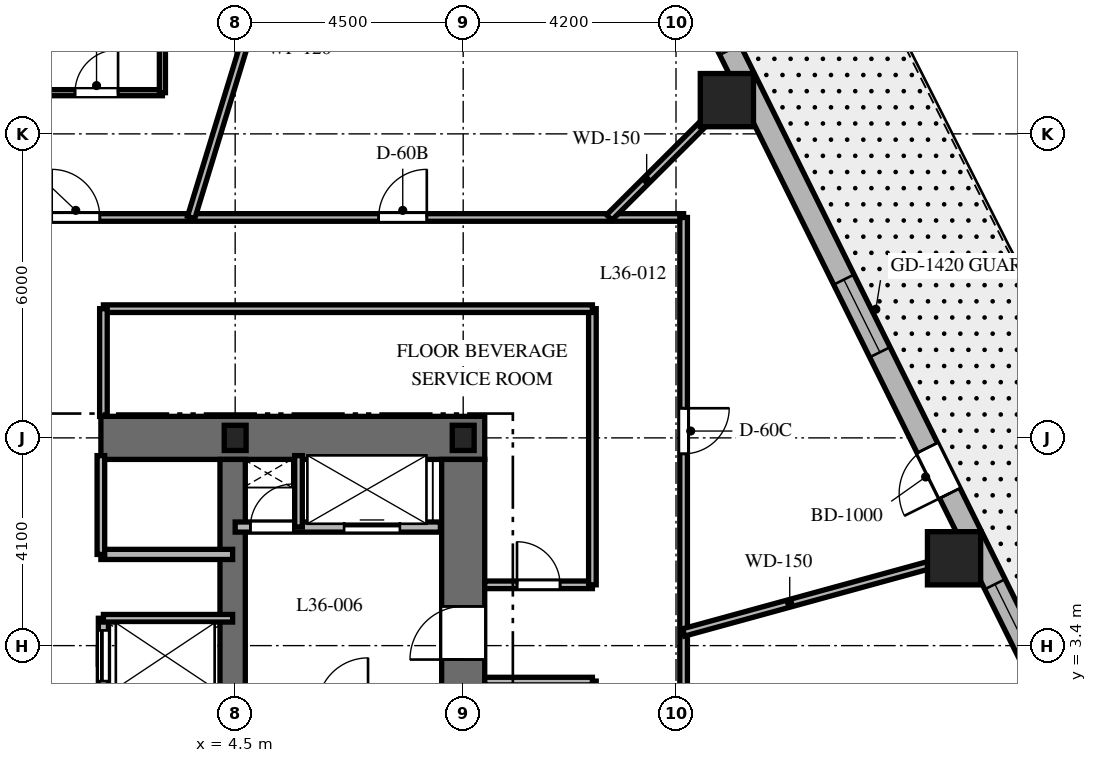
"""IFC4 building model, lengths in metres.
Left out: names, types, materials, properties, quantities, classifications, styles, units other than length and angle.
Written with IfcOpenShell. Run it as: python <this file> out.ifc"""

import sys

from ifc_helpers import new_model, si_unit, direction, frame, frame_2d, origin, origin_2d, place, context, subcontext, project, spatial, rectangle, i_section, extrude, element, fill, save


model = new_model("IFC4")
c1 = context("Model", 3, precision=1e-05, world=origin(), true_north=direction((0.0, 1.0)))
c2 = subcontext(c1, "Body", "Model", "MODEL_VIEW")
j1 = project(units=[si_unit("LENGTHUNIT", "METRE"), si_unit("PLANEANGLEUNIT", "RADIAN")], contexts=[c1])
p1 = place(None, origin())
s1 = spatial("IfcSite", under=j1, at=p1, CompositionType="ELEMENT")
p2 = place(p1, origin())
s2 = spatial("IfcBuilding", under=s1, at=p2, CompositionType="ELEMENT")
p3 = place(p2, frame((0.0, 0.0, 148.0)))
s3 = spatial("IfcBuildingStorey", under=s2, at=p3, CompositionType="ELEMENT", Elevation=148.0)
p4 = place(p3, frame((1.85, 7.5, 0.0), z_axis=(0.0, 0.0, 1.0), x_axis=(1.0, 0.0, 0.0)))
e1 = element("IfcWall", 1, at=p4, inside=s3, PredefinedType="SHEAR", context=c2, shape_type="SweptSolid", body=[
    extrude(rectangle(XDim=7.575, YDim=0.85, at=frame_2d((3.788, 0.0))), origin(), (0.0, 0.0, 1.0), 3.7),
])
p5 = place(p3, frame((9.0, -7.075, 0.0), z_axis=(0.0, 0.0, 1.0), x_axis=(0.0, 1.0, 0.0)))
e2 = element("IfcWall", 2, at=p5, inside=s3, PredefinedType="SHEAR", context=c2, shape_type="SweptSolid", body=[
    extrude(rectangle(XDim=14.15, YDim=0.85, at=frame_2d((7.075, 0.0))), origin(), (0.0, 0.0, 1.0), 3.7),
])
p6 = place(p5, frame((10.2, 0.0, 0.0)))
e3 = element("IfcOpeningElement", 3, at=p6, cuts=e2, PredefinedType="OPENING", context=c2, shape_type="SweptSolid", body=[
    extrude(rectangle(XDim=1.05, YDim=2.15, at=frame_2d((0.525, 1.075))), frame((0.0, 0.435, 0.0), z_axis=(0.0, -1.0, 0.0), x_axis=(1.0, 0.0, 0.0)), (0.0, 0.0, 1.0), 0.87),
])
p7 = place(p3, frame((4.45, 2.25, 0.0), z_axis=(0.0, 0.0, 1.0), x_axis=(0.0, 1.0, 0.0)))
e4 = element("IfcWall", 4, at=p7, inside=s3, PredefinedType="SHEAR", context=c2, shape_type="SweptSolid", body=[
    extrude(rectangle(XDim=4.825, YDim=0.5, at=frame_2d((2.413, 0.0))), origin(), (0.0, 0.0, 1.0), 3.7),
])
for number, where, z_axis, x_axis in (
    (5, (9.0, 7.5, 0.0), (0.0, 0.0, 1.0), (1.0, 0.0, 0.0)),
    (6, (4.5, 7.5, 0.0), (0.0, 0.0, 1.0), (1.0, 0.0, 0.0)),
):
    element("IfcColumn", number, at=place(p3, frame(where, z_axis=z_axis, x_axis=x_axis)), inside=s3, PredefinedType="COLUMN", context=c2, shape_type="SweptSolid", body=[
        extrude(i_section(OverallWidth=0.432, OverallDepth=0.498, WebThickness=0.056, FlangeThickness=0.089, at=origin_2d()), origin(), (0.0, 0.0, 1.0), 3.7),
    ])
for number, where, z_axis, x_axis in (
    (7, (18.687, 5.124, 0.0), (0.0, 0.0, 1.0), (1.0, 0.0, 0.0)),
    (8, (14.204, 14.166, 0.0), (0.0, 0.0, 1.0), (1.0, 0.0, 0.0)),
):
    element("IfcColumn", number, at=place(p3, frame(where, z_axis=z_axis, x_axis=x_axis)), inside=s3, PredefinedType="COLUMN", context=c2, shape_type="SweptSolid", body=[
        extrude(rectangle(XDim=1.05, YDim=1.05, at=origin_2d()), origin(), (0.0, 0.0, 1.0), 3.7),
    ])
p8 = place(p3, frame((20.618, 2.344, 0.0), z_axis=(0.0, 0.0, 1.0), x_axis=(-0.444243691097, 0.895905990002, 0.0)))
e9 = element("IfcWall", 9, at=p8, inside=s3, PredefinedType="SOLIDWALL", context=c2, shape_type="SweptSolid", body=[
    extrude(rectangle(XDim=16.784, YDim=0.45, at=frame_2d((8.392, 0.0))), origin(), (0.0, 0.0, 1.0), 3.4),
])
p9 = place(p8, frame((4.535, 0.0, 0.0)))
e10 = element("IfcOpeningElement", 10, at=p9, cuts=e9, PredefinedType="OPENING", context=c2, shape_type="SweptSolid", body=[
    extrude(rectangle(XDim=1.0, YDim=2.15, at=frame_2d((0.5, 1.075))), frame((0.0, 0.235, 0.0), z_axis=(0.0, -1.0, 0.0), x_axis=(1.0, 0.0, 0.0)), (0.0, 0.0, 1.0), 0.47),
])
p10 = place(p8, frame((7.642, 0.0, 0.8)))
e11 = element("IfcOpeningElement", 11, at=p10, cuts=e9, PredefinedType="OPENING", context=c2, shape_type="SweptSolid", body=[
    extrude(rectangle(XDim=1.6, YDim=1.75, at=frame_2d((0.8, 0.875))), frame((0.0, 0.235, 0.0), z_axis=(0.0, -1.0, 0.0), x_axis=(1.0, 0.0, 0.0)), (0.0, 0.0, 1.0), 0.47),
])
p11 = place(p8, frame((14.303, 0.0, 0.8)))
e12 = element("IfcOpeningElement", 12, at=p11, cuts=e9, PredefinedType="OPENING", context=c2, shape_type="SweptSolid", body=[
    extrude(rectangle(XDim=1.6, YDim=1.75, at=frame_2d((0.8, 0.875))), frame((0.0, 0.235, 0.0), z_axis=(0.0, -1.0, 0.0), x_axis=(1.0, 0.0, 0.0)), (0.0, 0.0, 1.0), 0.47),
])
p12 = place(p8, frame((0.931, 0.0, 0.8)))
e13 = element("IfcOpeningElement", 13, at=p12, cuts=e9, PredefinedType="OPENING", context=c2, shape_type="SweptSolid", body=[
    extrude(rectangle(XDim=1.6, YDim=1.75, at=frame_2d((0.8, 0.875))), frame((0.0, 0.235, 0.0), z_axis=(0.0, -1.0, 0.0), x_axis=(1.0, 0.0, 0.0)), (0.0, 0.0, 1.0), 0.47),
])
p13 = place(p3, frame((4.5, 5.74, 0.0), z_axis=(0.0, 0.0, 1.0), x_axis=(1.0, 0.0, 0.0)))
e14 = element("IfcWall", 14, at=p13, inside=s3, PredefinedType="PARTITIONING", context=c2, shape_type="SweptSolid", body=[
    extrude(rectangle(XDim=4.05, YDim=0.2, at=frame_2d((2.025, 0.0))), origin(), (0.0, 0.0, 1.0), 3.4),
])
p14 = place(p13, frame((0.3, 0.0, 0.0)))
e15 = element("IfcOpeningElement", 15, at=p14, cuts=e14, PredefinedType="OPENING", context=c2, shape_type="SweptSolid", body=[
    extrude(rectangle(XDim=0.85, YDim=2.03, at=frame_2d((0.425, 1.015))), frame((0.0, 0.11, 0.0), z_axis=(0.0, -1.0, 0.0), x_axis=(1.0, 0.0, 0.0)), (0.0, 0.0, 1.0), 0.22),
])
p15 = place(p13, frame((2.15, 0.0, 0.0)))
e16 = element("IfcOpeningElement", 16, at=p15, cuts=e14, PredefinedType="OPENING", context=c2, shape_type="SweptSolid", body=[
    extrude(rectangle(XDim=1.1, YDim=2.2, at=frame_2d((0.55, 1.1))), frame((0.0, 0.11, 0.0), z_axis=(0.0, -1.0, 0.0), x_axis=(1.0, 0.0, 0.0)), (0.0, 0.0, 1.0), 0.22),
])
p16 = place(p3, frame((5.75, 5.74, 0.0), z_axis=(0.0, 0.0, 1.0), x_axis=(0.0, 1.0, 0.0)))
e17 = element("IfcWall", 17, at=p16, inside=s3, PredefinedType="PARTITIONING", context=c2, shape_type="SweptSolid", body=[
    extrude(rectangle(XDim=1.41, YDim=0.15, at=frame_2d((0.705, 0.0))), origin(), (0.0, 0.0, 1.0), 3.4),
])
p17 = place(p3, frame((1.85, 5.2, 0.0), z_axis=(0.0, 0.0, 1.0), x_axis=(1.0, 0.0, 0.0)))
e18 = element("IfcWall", 18, at=p17, inside=s3, PredefinedType="PARTITIONING", context=c2, shape_type="SweptSolid", body=[
    extrude(rectangle(XDim=2.6, YDim=0.2, at=frame_2d((1.3, 0.0))), origin(), (0.0, 0.0, 1.0), 3.4),
])
p18 = place(p3, frame((1.85, 5.2, 0.0), z_axis=(0.0, 0.0, 1.0), x_axis=(0.0, 1.0, 0.0)))
e19 = element("IfcWall", 19, at=p18, inside=s3, PredefinedType="PARTITIONING", context=c2, shape_type="SweptSolid", body=[
    extrude(rectangle(XDim=1.95, YDim=0.15, at=frame_2d((0.975, 0.0))), origin(), (0.0, 0.0, 1.0), 3.4),
])
p19 = place(p3, frame((1.9, -0.5, 0.0), z_axis=(0.0, 0.0, 1.0), x_axis=(0.0, 1.0, 0.0)))
e20 = element("IfcWall", 20, at=p19, inside=s3, PredefinedType="PARTITIONING", context=c2, shape_type="SweptSolid", body=[
    extrude(rectangle(XDim=4.44, YDim=0.2, at=frame_2d((2.22, 0.0))), origin(), (0.0, 0.0, 1.0), 3.4),
])
p20 = place(p19, frame((0.24, 0.0, 0.0)))
e21 = element("IfcOpeningElement", 21, at=p20, cuts=e20, PredefinedType="OPENING", context=c2, shape_type="SweptSolid", body=[
    extrude(rectangle(XDim=1.0, YDim=2.2, at=frame_2d((0.5, 1.1))), frame((0.0, 0.11, 0.0), z_axis=(0.0, -1.0, 0.0), x_axis=(1.0, 0.0, 0.0)), (0.0, 0.0, 1.0), 0.22),
])
p21 = place(p19, frame((1.72, 0.0, 0.0)))
e22 = element("IfcOpeningElement", 22, at=p21, cuts=e20, PredefinedType="OPENING", context=c2, shape_type="SweptSolid", body=[
    extrude(rectangle(XDim=1.0, YDim=2.2, at=frame_2d((0.5, 1.1))), frame((0.0, 0.11, 0.0), z_axis=(0.0, -1.0, 0.0), x_axis=(1.0, 0.0, 0.0)), (0.0, 0.0, 1.0), 0.22),
])
p22 = place(p19, frame((3.2, 0.0, 0.0)))
e23 = element("IfcOpeningElement", 23, at=p22, cuts=e20, PredefinedType="OPENING", context=c2, shape_type="SweptSolid", body=[
    extrude(rectangle(XDim=1.0, YDim=2.2, at=frame_2d((0.5, 1.1))), frame((0.0, 0.11, 0.0), z_axis=(0.0, -1.0, 0.0), x_axis=(1.0, 0.0, 0.0)), (0.0, 0.0, 1.0), 0.22),
])
p23 = place(p3, frame((1.9, 3.94, 0.0), z_axis=(0.0, 0.0, 1.0), x_axis=(1.0, 0.0, 0.0)))
e24 = element("IfcWall", 24, at=p23, inside=s3, PredefinedType="PARTITIONING", context=c2, shape_type="SweptSolid", body=[
    extrude(rectangle(XDim=2.55, YDim=0.15, at=frame_2d((1.275, 0.0))), origin(), (0.0, 0.0, 1.0), 3.4),
])
p24 = place(p3, frame((-13.35, 11.85, 0.0), z_axis=(0.0, 0.0, 1.0), x_axis=(1.0, 0.0, 0.0)))
e25 = element("IfcWall", 25, at=p24, inside=s3, PredefinedType="PARTITIONING", context=c2, shape_type="SweptSolid", body=[
    extrude(rectangle(XDim=26.7, YDim=0.15, at=frame_2d((13.35, 0.0))), origin(), (0.0, 0.0, 1.0), 2.84),
])
p25 = place(p24, frame((20.682, 0.0, 0.0)))
e26 = element("IfcOpeningElement", 26, at=p25, cuts=e25, PredefinedType="OPENING", context=c2, shape_type="SweptSolid", body=[
    extrude(rectangle(XDim=0.95, YDim=2.03, at=frame_2d((0.475, 1.015))), frame((0.0, 0.085, 0.0), z_axis=(0.0, -1.0, 0.0), x_axis=(1.0, 0.0, 0.0)), (0.0, 0.0, 1.0), 0.17),
])
p26 = place(p24, frame((14.229, 0.0, 0.0)))
e27 = element("IfcOpeningElement", 27, at=p26, cuts=e25, PredefinedType="OPENING", context=c2, shape_type="SweptSolid", body=[
    extrude(rectangle(XDim=0.95, YDim=2.03, at=frame_2d((0.475, 1.015))), frame((0.0, 0.085, 0.0), z_axis=(0.0, -1.0, 0.0), x_axis=(1.0, 0.0, 0.0)), (0.0, 0.0, 1.0), 0.17),
])
p27 = place(p24, frame((10.075, 0.0, 0.0)))
e28 = element("IfcOpeningElement", 28, at=p27, cuts=e25, PredefinedType="OPENING", context=c2, shape_type="SweptSolid", body=[
    extrude(rectangle(XDim=0.95, YDim=2.03, at=frame_2d((0.475, 1.015))), frame((0.0, 0.085, 0.0), z_axis=(0.0, -1.0, 0.0), x_axis=(1.0, 0.0, 0.0)), (0.0, 0.0, 1.0), 0.17),
])
p28 = place(p24, frame((3.995, 0.0, 0.0)))
e29 = element("IfcOpeningElement", 29, at=p28, cuts=e25, PredefinedType="OPENING", context=c2, shape_type="SweptSolid", body=[
    extrude(rectangle(XDim=0.95, YDim=2.03, at=frame_2d((0.475, 1.015))), frame((0.0, 0.085, 0.0), z_axis=(0.0, -1.0, 0.0), x_axis=(1.0, 0.0, 0.0)), (0.0, 0.0, 1.0), 0.17),
])
p29 = place(p3, frame((13.35, 11.85, 0.0), z_axis=(0.0, 0.0, 1.0), x_axis=(0.0, -1.0, 0.0)))
e30 = element("IfcWall", 30, at=p29, inside=s3, PredefinedType="PARTITIONING", context=c2, shape_type="SweptSolid", body=[
    extrude(rectangle(XDim=23.7, YDim=0.15, at=frame_2d((11.85, 0.0))), origin(), (0.0, 0.0, 1.0), 2.84),
])
p30 = place(p29, frame((3.765, 0.0, 0.0)))
e31 = element("IfcOpeningElement", 31, at=p30, cuts=e30, PredefinedType="OPENING", context=c2, shape_type="SweptSolid", body=[
    extrude(rectangle(XDim=0.9, YDim=2.03, at=frame_2d((0.45, 1.015))), frame((0.0, 0.085, 0.0), z_axis=(0.0, -1.0, 0.0), x_axis=(1.0, 0.0, 0.0)), (0.0, 0.0, 1.0), 0.17),
])
p31 = place(p29, frame((20.395, 0.0, 0.0)))
e32 = element("IfcOpeningElement", 32, at=p31, cuts=e30, PredefinedType="OPENING", context=c2, shape_type="SweptSolid", body=[
    extrude(rectangle(XDim=0.9, YDim=2.03, at=frame_2d((0.45, 1.015))), frame((0.0, 0.085, 0.0), z_axis=(0.0, -1.0, 0.0), x_axis=(1.0, 0.0, 0.0)), (0.0, 0.0, 1.0), 0.17),
])
p32 = place(p29, frame((15.787, 0.0, 0.0)))
e33 = element("IfcOpeningElement", 33, at=p32, cuts=e30, PredefinedType="OPENING", context=c2, shape_type="SweptSolid", body=[
    extrude(rectangle(XDim=0.95, YDim=2.03, at=frame_2d((0.475, 1.015))), frame((0.0, 0.085, 0.0), z_axis=(0.0, -1.0, 0.0), x_axis=(1.0, 0.0, 0.0)), (0.0, 0.0, 1.0), 0.17),
])
p33 = place(p29, frame((10.751, 0.0, 0.0)))
e34 = element("IfcOpeningElement", 34, at=p33, cuts=e30, PredefinedType="OPENING", context=c2, shape_type="SweptSolid", body=[
    extrude(rectangle(XDim=0.95, YDim=2.03, at=frame_2d((0.475, 1.015))), frame((0.0, 0.085, 0.0), z_axis=(0.0, -1.0, 0.0), x_axis=(1.0, 0.0, 0.0)), (0.0, 0.0, 1.0), 0.17),
])
p34 = place(p3, frame((11.55, -10.05, 0.0), z_axis=(0.0, 0.0, 1.0), x_axis=(0.0, 1.0, 0.0)))
e35 = element("IfcWall", 35, at=p34, inside=s3, PredefinedType="PARTITIONING", context=c2, shape_type="SweptSolid", body=[
    extrude(rectangle(XDim=12.75, YDim=0.15, at=frame_2d((6.375, 0.0))), origin(), (0.0, 0.0, 1.0), 2.84),
])
p35 = place(p34, frame((5.95, 0.0, 0.0)))
e36 = element("IfcOpeningElement", 36, at=p35, cuts=e35, PredefinedType="OPENING", context=c2, shape_type="SweptSolid", body=[
    extrude(rectangle(XDim=0.85, YDim=2.03, at=frame_2d((0.425, 1.015))), frame((0.0, 0.085, 0.0), z_axis=(0.0, -1.0, 0.0), x_axis=(1.0, 0.0, 0.0)), (0.0, 0.0, 1.0), 0.17),
])
p36 = place(p3, frame((11.55, 2.7, 0.0), z_axis=(0.0, 0.0, 1.0), x_axis=(-1.0, 0.0, 0.0)))
e37 = element("IfcWall", 37, at=p36, inside=s3, PredefinedType="PARTITIONING", context=c2, shape_type="SweptSolid", body=[
    extrude(rectangle(XDim=2.125, YDim=0.15, at=frame_2d((1.062, 0.0))), origin(), (0.0, 0.0, 1.0), 3.4),
])
p37 = place(p3, frame((9.425, 4.6, 0.0), z_axis=(0.0, 0.0, 1.0), x_axis=(1.0, 0.0, 0.0)))
e38 = element("IfcWall", 38, at=p37, inside=s3, PredefinedType="PARTITIONING", context=c2, shape_type="SweptSolid", body=[
    extrude(rectangle(XDim=2.125, YDim=0.15, at=frame_2d((1.062, 0.0))), origin(), (0.0, 0.0, 1.0), 3.4),
])
p38 = place(p37, frame((0.637, 0.0, 0.0)))
e39 = element("IfcOpeningElement", 39, at=p38, cuts=e38, PredefinedType="OPENING", context=c2, shape_type="SweptSolid", body=[
    extrude(rectangle(XDim=0.85, YDim=2.03, at=frame_2d((0.425, 1.015))), frame((0.0, 0.085, 0.0), z_axis=(0.0, -1.0, 0.0), x_axis=(1.0, 0.0, 0.0)), (0.0, 0.0, 1.0), 0.17),
])
p39 = place(p3, frame((11.55, 4.6, 0.0), z_axis=(0.0, 0.0, 1.0), x_axis=(0.0, 1.0, 0.0)))
e40 = element("IfcWall", 40, at=p39, inside=s3, PredefinedType="PARTITIONING", context=c2, shape_type="SweptSolid", body=[
    extrude(rectangle(XDim=5.45, YDim=0.15, at=frame_2d((2.725, 0.0))), origin(), (0.0, 0.0, 1.0), 2.84),
])
p40 = place(p3, frame((11.55, 10.05, 0.0), z_axis=(0.0, 0.0, 1.0), x_axis=(-1.0, 0.0, 0.0)))
e41 = element("IfcWall", 41, at=p40, inside=s3, PredefinedType="PARTITIONING", context=c2, shape_type="SweptSolid", body=[
    extrude(rectangle(XDim=9.65, YDim=0.15, at=frame_2d((4.825, 0.0))), origin(), (0.0, 0.0, 1.0), 2.84),
])
p41 = place(p3, frame((1.9, 10.05, 0.0), z_axis=(0.0, 0.0, 1.0), x_axis=(0.0, -1.0, 0.0)))
e42 = element("IfcWall", 42, at=p41, inside=s3, PredefinedType="PARTITIONING", context=c2, shape_type="SweptSolid", body=[
    extrude(rectangle(XDim=2.125, YDim=0.15, at=frame_2d((1.062, 0.0))), origin(), (0.0, 0.0, 1.0), 3.4),
])
p42 = place(p3, frame((13.35, 3.661, 0.0), z_axis=(0.0, 0.0, 1.0), x_axis=(0.964397145454, 0.264458211898, 0.0)))
e43 = element("IfcWall", 43, at=p42, inside=s3, PredefinedType="PARTITIONING", context=c2, shape_type="SweptSolid", body=[
    extrude(rectangle(XDim=6.039, YDim=0.15, at=frame_2d((3.019, 0.0))), origin(), (0.0, 0.0, 1.0), 2.64),
])
p43 = place(p3, frame((11.882, 11.85, 0.0), z_axis=(0.0, 0.0, 1.0), x_axis=(0.708037373639, 0.706174962407, 0.0)))
e44 = element("IfcWall", 44, at=p43, inside=s3, PredefinedType="PARTITIONING", context=c2, shape_type="SweptSolid", body=[
    extrude(rectangle(XDim=3.802, YDim=0.15, at=frame_2d((1.901, 0.0))), origin(), (0.0, 0.0, 1.0), 2.64),
])
p44 = place(p3, frame((3.631, 11.85, 0.0), z_axis=(0.0, 0.0, 1.0), x_axis=(0.293007573338, 0.956110120209, 0.0)))
e45 = element("IfcWall", 45, at=p44, inside=s3, PredefinedType="PARTITIONING", context=c2, shape_type="SweptSolid", body=[
    extrude(rectangle(XDim=7.766, YDim=0.15, at=frame_2d((3.883, 0.0))), origin(), (0.0, 0.0, 1.0), 2.64),
])
p45 = place(p3, frame((0.464, 14.313, 0.0), z_axis=(0.0, 0.0, 1.0), x_axis=(1.0, 0.0, 0.0)))
e46 = element("IfcWall", 46, at=p45, inside=s3, PredefinedType="PARTITIONING", context=c2, shape_type="SweptSolid", body=[
    extrude(rectangle(XDim=2.6, YDim=0.12, at=frame_2d((1.3, 0.0))), origin(), (0.0, 0.0, 1.0), 3.4),
])
p46 = place(p45, frame((0.875, 0.0, 0.0)))
e47 = element("IfcOpeningElement", 47, at=p46, cuts=e46, PredefinedType="OPENING", context=c2, shape_type="SweptSolid", body=[
    extrude(rectangle(XDim=0.85, YDim=2.03, at=frame_2d((0.425, 1.015))), frame((0.0, 0.07, 0.0), z_axis=(0.0, -1.0, 0.0), x_axis=(1.0, 0.0, 0.0)), (0.0, 0.0, 1.0), 0.14),
])
p47 = place(p3, frame((3.064, 14.313, 0.0), z_axis=(0.0, 0.0, 1.0), x_axis=(0.0, 1.0, 0.0)))
e48 = element("IfcWall", 48, at=p47, inside=s3, PredefinedType="PARTITIONING", context=c2, shape_type="SweptSolid", body=[
    extrude(rectangle(XDim=2.75, YDim=0.12, at=frame_2d((1.375, 0.0))), origin(), (0.0, 0.0, 1.0), 2.841),
])
p48 = place(p9, origin())
e49 = element("IfcDoor", 49, at=p48, inside=s3, OperationType="SINGLE_SWING_LEFT", PredefinedType="DOOR", context=c2, shape_type="SweptSolid", body=[
    extrude(rectangle(XDim=1.0, YDim=2.15, at=frame_2d((0.5, 1.075))), frame((0.0, 0.025, 0.0), z_axis=(0.0, -1.0, 0.0), x_axis=(1.0, 0.0, 0.0)), (0.0, 0.0, 1.0), 0.05),
])
fill(e10, e49)
p49 = place(p10, origin())
e50 = element("IfcWindow", 50, at=p49, inside=s3, PartitioningType="SINGLE_PANEL", PredefinedType="WINDOW", context=c2, shape_type="SweptSolid", body=[
    extrude(rectangle(XDim=1.6, YDim=1.75, at=frame_2d((0.8, 0.875))), frame((0.0, 0.03, 0.0), z_axis=(0.0, -1.0, 0.0), x_axis=(1.0, 0.0, 0.0)), (0.0, 0.0, 1.0), 0.06),
])
fill(e11, e50)
p50 = place(p12, origin())
e51 = element("IfcWindow", 51, at=p50, inside=s3, PartitioningType="SINGLE_PANEL", PredefinedType="WINDOW", context=c2, shape_type="SweptSolid", body=[
    extrude(rectangle(XDim=1.6, YDim=1.75, at=frame_2d((0.8, 0.875))), frame((0.0, 0.03, 0.0), z_axis=(0.0, -1.0, 0.0), x_axis=(1.0, 0.0, 0.0)), (0.0, 0.0, 1.0), 0.06),
])
fill(e13, e51)
p51 = place(p6, origin())
e52 = element("IfcDoor", 52, at=p51, inside=s3, OperationType="SINGLE_SWING_LEFT", PredefinedType="DOOR", context=c2, shape_type="SweptSolid", body=[
    extrude(rectangle(XDim=1.05, YDim=2.15, at=frame_2d((0.525, 1.075))), frame((0.0, 0.025, 0.0), z_axis=(0.0, -1.0, 0.0), x_axis=(1.0, 0.0, 0.0)), (0.0, 0.0, 1.0), 0.05),
])
fill(e3, e52)
p52 = place(p14, origin())
e53 = element("IfcDoor", 53, at=p52, inside=s3, OperationType="SINGLE_SWING_RIGHT", PredefinedType="DOOR", context=c2, shape_type="SweptSolid", body=[
    extrude(rectangle(XDim=0.85, YDim=2.03, at=frame_2d((0.425, 1.015))), frame((0.0, 0.025, 0.0), z_axis=(0.0, -1.0, 0.0), x_axis=(1.0, 0.0, 0.0)), (0.0, 0.0, 1.0), 0.05),
])
fill(e15, e53)
p53 = place(p15, origin())
e54 = element("IfcDoor", 54, at=p53, inside=s3, OperationType="SLIDING_TO_RIGHT", PredefinedType="DOOR", context=c2, shape_type="SweptSolid", body=[
    extrude(rectangle(XDim=1.1, YDim=2.2, at=frame_2d((0.55, 1.1))), frame((0.0, 0.025, 0.0), z_axis=(0.0, -1.0, 0.0), x_axis=(1.0, 0.0, 0.0)), (0.0, 0.0, 1.0), 0.05),
])
fill(e16, e54)
p54 = place(p22, origin())
e55 = element("IfcDoor", 55, at=p54, inside=s3, OperationType="SLIDING_TO_RIGHT", PredefinedType="DOOR", context=c2, shape_type="SweptSolid", body=[
    extrude(rectangle(XDim=1.0, YDim=2.2, at=frame_2d((0.5, 1.1))), frame((0.0, 0.025, 0.0), z_axis=(0.0, -1.0, 0.0), x_axis=(1.0, 0.0, 0.0)), (0.0, 0.0, 1.0), 0.05),
])
fill(e23, e55)
p55 = place(p38, origin())
e56 = element("IfcDoor", 56, at=p55, inside=s3, OperationType="SINGLE_SWING_LEFT", PredefinedType="DOOR", context=c2, shape_type="SweptSolid", body=[
    extrude(rectangle(XDim=0.85, YDim=2.03, at=frame_2d((0.425, 1.015))), frame((0.0, 0.025, 0.0), z_axis=(0.0, -1.0, 0.0), x_axis=(1.0, 0.0, 0.0)), (0.0, 0.0, 1.0), 0.05),
])
fill(e39, e56)
p56 = place(p30, origin())
e57 = element("IfcDoor", 57, at=p56, inside=s3, OperationType="SINGLE_SWING_LEFT", PredefinedType="DOOR", context=c2, shape_type="SweptSolid", body=[
    extrude(rectangle(XDim=0.9, YDim=2.03, at=frame_2d((0.45, 1.015))), frame((0.0, 0.025, 0.0), z_axis=(0.0, -1.0, 0.0), x_axis=(1.0, 0.0, 0.0)), (0.0, 0.0, 1.0), 0.05),
])
fill(e31, e57)
p57 = place(p25, origin())
e58 = element("IfcDoor", 58, at=p57, inside=s3, OperationType="SINGLE_SWING_RIGHT", PredefinedType="DOOR", context=c2, shape_type="SweptSolid", body=[
    extrude(rectangle(XDim=0.95, YDim=2.03, at=frame_2d((0.475, 1.015))), frame((0.0, 0.025, 0.0), z_axis=(0.0, -1.0, 0.0), x_axis=(1.0, 0.0, 0.0)), (0.0, 0.0, 1.0), 0.05),
])
fill(e26, e58)
p58 = place(p26, origin())
e59 = element("IfcDoor", 59, at=p58, inside=s3, OperationType="SINGLE_SWING_LEFT", PredefinedType="DOOR", context=c2, shape_type="SweptSolid", body=[
    extrude(rectangle(XDim=0.95, YDim=2.03, at=frame_2d((0.475, 1.015))), frame((0.0, 0.025, 0.0), z_axis=(0.0, -1.0, 0.0), x_axis=(1.0, 0.0, 0.0)), (0.0, 0.0, 1.0), 0.05),
])
fill(e27, e59)
p59 = place(p46, origin())
e60 = element("IfcDoor", 60, at=p59, inside=s3, OperationType="SINGLE_SWING_RIGHT", PredefinedType="DOOR", context=c2, shape_type="SweptSolid", body=[
    extrude(rectangle(XDim=0.85, YDim=2.03, at=frame_2d((0.425, 1.015))), frame((0.0, 0.025, 0.0), z_axis=(0.0, -1.0, 0.0), x_axis=(1.0, 0.0, 0.0)), (0.0, 0.0, 1.0), 0.05),
])
fill(e47, e60)
save(model, sys.argv[1])
